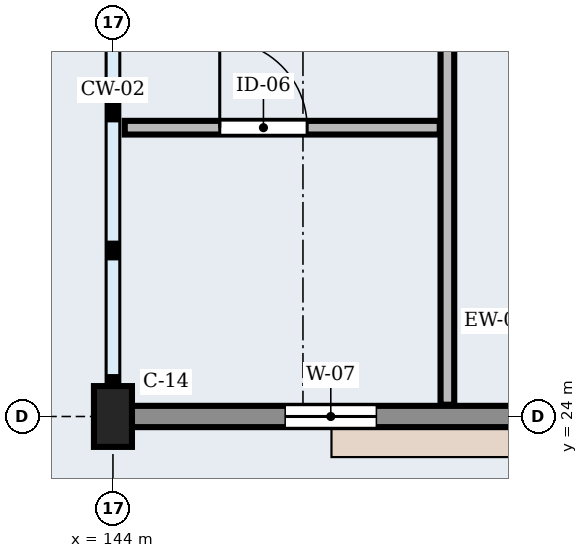
"""IFC4 building model, lengths in metres.
Left out: names, types, materials, properties, quantities, classifications, styles, units other than length and angle.
Written with IfcOpenShell. Run it as: python <this file> out.ifc"""

import sys

from ifc_helpers import new_model, si_unit, direction, frame, frame_2d, origin, origin_2d, place, context, subcontext, project, spatial, rectangle, extrude, element, fill, save


model = new_model("IFC4")
c1 = context("Model", 3, precision=1e-05, world=origin(), true_north=direction((0.0, 1.0)))
c2 = subcontext(c1, "Body", "Model", "MODEL_VIEW")
j1 = project(units=[si_unit("LENGTHUNIT", "METRE"), si_unit("PLANEANGLEUNIT", "RADIAN")], contexts=[c1])
p1 = place(None, origin())
s1 = spatial("IfcSite", under=j1, at=p1, CompositionType="ELEMENT")
p2 = place(p1, origin())
s2 = spatial("IfcBuilding", under=s1, at=p2, CompositionType="ELEMENT")
p3 = place(p2, frame((0.0, 0.0, 22.8)))
s3 = spatial("IfcBuildingStorey", under=s2, at=p3, CompositionType="ELEMENT", Elevation=22.8)
p4 = place(p3, frame((144.0, 24.0, 0.0), z_axis=(0.0, 0.0, 1.0), x_axis=(1.0, 0.0, 0.0)))
e1 = element("IfcColumn", 1, at=p4, inside=s3, PredefinedType="COLUMN", context=c2, shape_type="SweptSolid", body=[
    extrude(rectangle(XDim=0.5, YDim=0.8, at=origin_2d()), origin(), (0.0, 0.0, 1.0), 4.2),
])
p5 = place(p3, frame((152.702, 24.0, 0.0), z_axis=(0.0, 0.0, 1.0), x_axis=(-1.0, 0.0, 0.0)))
e2 = element("IfcWall", 2, at=p5, inside=s3, PredefinedType="STANDARD", context=c2, shape_type="SweptSolid", body=[
    extrude(rectangle(XDim=8.454, YDim=0.28, at=frame_2d((4.227, 0.0))), origin(), (0.0, 0.0, 1.0), 3.37),
])
p6 = place(p5, frame((2.018, 0.0, 0.7)))
e3 = element("IfcOpeningElement", 3, at=p6, cuts=e2, PredefinedType="OPENING", context=c2, shape_type="SweptSolid", body=[
    extrude(rectangle(XDim=1.2, YDim=1.8, at=frame_2d((0.6, 0.9))), frame((0.0, 0.152, 0.0), z_axis=(0.0, -1.0, 0.0), x_axis=(1.0, 0.0, 0.0)), (0.0, 0.0, 1.0), 0.304),
])
p7 = place(p5, frame((5.236, 0.0, 0.7)))
e4 = element("IfcOpeningElement", 4, at=p7, cuts=e2, PredefinedType="OPENING", context=c2, shape_type="SweptSolid", body=[
    extrude(rectangle(XDim=1.2, YDim=1.8, at=frame_2d((0.6, 0.9))), frame((0.0, 0.152, 0.0), z_axis=(0.0, -1.0, 0.0), x_axis=(1.0, 0.0, 0.0)), (0.0, 0.0, 1.0), 0.304),
])
p8 = place(p3, frame((148.4, 24.155, 0.0), z_axis=(0.0, 0.0, 1.0), x_axis=(0.0, 1.0, 0.0)))
e5 = element("IfcWall", 5, at=p8, inside=s3, PredefinedType="STANDARD", context=c2, shape_type="SweptSolid", body=[
    extrude(rectangle(XDim=16.345, YDim=0.18, at=frame_2d((8.172, 0.0))), origin(), (0.0, 0.0, 1.0), 3.89),
])
p9 = place(p8, frame((7.575, 0.0, 0.0)))
e6 = element("IfcOpeningElement", 6, at=p9, cuts=e5, PredefinedType="OPENING", context=c2, shape_type="SweptSolid", body=[
    extrude(rectangle(XDim=1.15, YDim=2.15, at=frame_2d((0.575, 1.075))), frame((0.0, 0.102, 0.0), z_axis=(0.0, -1.0, 0.0), x_axis=(1.0, 0.0, 0.0)), (0.0, 0.0, 1.0), 0.204),
])
p10 = place(p3, frame((144.155, 27.8, 0.0), z_axis=(0.0, 0.0, 1.0), x_axis=(1.0, 0.0, 0.0)))
e7 = element("IfcWall", 7, at=p10, inside=s3, PredefinedType="STANDARD", context=c2, shape_type="SweptSolid", body=[
    extrude(rectangle(XDim=4.145, YDim=0.18, at=frame_2d((2.073, 0.0))), origin(), (0.0, 0.0, 1.0), 3.89),
])
p11 = place(p10, frame((1.25, 0.0, 0.0)))
e8 = element("IfcOpeningElement", 8, at=p11, cuts=e7, PredefinedType="OPENING", context=c2, shape_type="SweptSolid", body=[
    extrude(rectangle(XDim=1.15, YDim=2.15, at=frame_2d((0.575, 1.075))), frame((0.0, 0.102, 0.0), z_axis=(0.0, -1.0, 0.0), x_axis=(1.0, 0.0, 0.0)), (0.0, 0.0, 1.0), 0.204),
])
p12 = place(p7, origin())
e9 = element("IfcWindow", 9, at=p12, inside=s3, PartitioningType="SINGLE_PANEL", PredefinedType="WINDOW", context=c2, shape_type="SweptSolid", body=[
    extrude(rectangle(XDim=1.2, YDim=1.8, at=frame_2d((0.6, 0.9))), frame((0.0, 0.03, 0.0), z_axis=(0.0, -1.0, 0.0), x_axis=(1.0, 0.0, 0.0)), (0.0, 0.0, 1.0), 0.06),
])
fill(e4, e9)
p13 = place(p11, origin())
e10 = element("IfcDoor", 10, at=p13, inside=s3, OperationType="SINGLE_SWING_LEFT", PredefinedType="DOOR", context=c2, shape_type="SweptSolid", body=[
    extrude(rectangle(XDim=1.15, YDim=2.15, at=frame_2d((0.575, 1.075))), frame((0.0, 0.025, 0.0), z_axis=(0.0, -1.0, 0.0), x_axis=(1.0, 0.0, 0.0)), (0.0, 0.0, 1.0), 0.05),
])
fill(e8, e10)
save(model, sys.argv[1])
